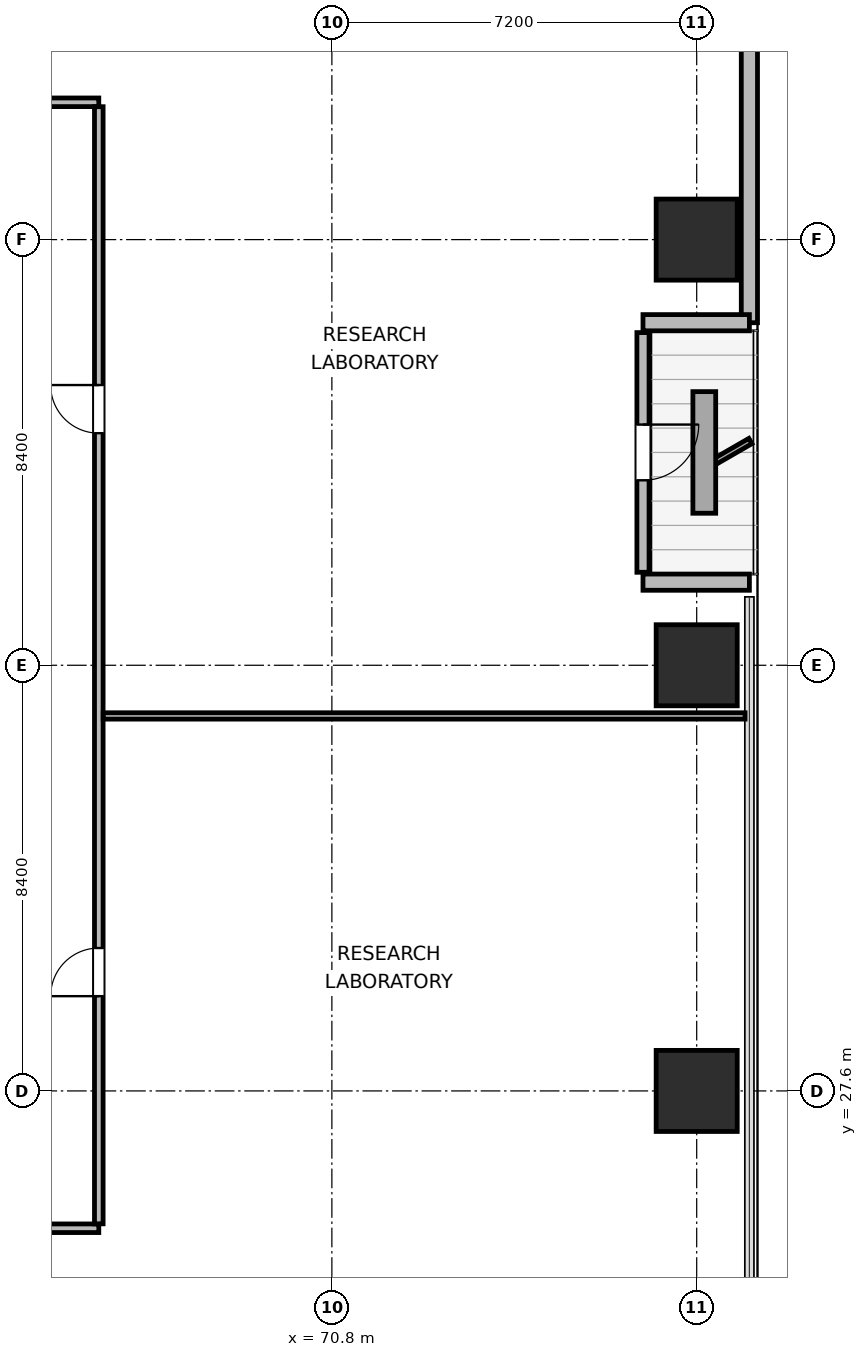
"""IFC4 building model, lengths in metres.
Left out: names, types, materials, properties, quantities, classifications, styles, units other than length and angle.
Written with IfcOpenShell. Run it as: python <this file> out.ifc"""

import sys

from ifc_helpers import new_model, si_unit, direction, frame, frame_2d, origin, origin_2d, place, context, subcontext, project, spatial, rectangle, extrude, element, fill, save


model = new_model("IFC4")
c1 = context("Model", 3, precision=1e-05, world=origin(), true_north=direction((0.0, 1.0)))
c2 = subcontext(c1, "Body", "Model", "MODEL_VIEW")
j1 = project(units=[si_unit("LENGTHUNIT", "METRE"), si_unit("PLANEANGLEUNIT", "RADIAN")], contexts=[c1])
p1 = place(None, origin())
s1 = spatial("IfcSite", under=j1, at=p1, CompositionType="ELEMENT")
p2 = place(p1, origin())
s2 = spatial("IfcBuilding", under=s1, at=p2, CompositionType="ELEMENT")
p3 = place(p2, frame((0.0, 0.0, 52.8)))
s3 = spatial("IfcBuildingStorey", under=s2, at=p3, CompositionType="ELEMENT", Elevation=52.8)
for number, where, z_axis, x_axis in (
    (1, (78.0, 27.6, 0.0), (0.0, 0.0, 1.0), (1.0, 0.0, 0.0)),
    (2, (78.0, 36.0, 0.0), (0.0, 0.0, 1.0), (1.0, 0.0, 0.0)),
    (3, (78.0, 44.4, 0.0), (0.0, 0.0, 1.0), (1.0, 0.0, 0.0)),
):
    element("IfcColumn", number, at=place(p3, frame(where, z_axis=z_axis, x_axis=x_axis)), inside=s3, PredefinedType="COLUMN", context=c2, shape_type="SweptSolid", body=[
        extrude(rectangle(XDim=1.6, YDim=1.6, at=origin_2d()), origin(), (0.0, 0.0, 1.0), 3.9),
    ])
p4 = place(p3, frame((79.04, 56.979, 0.0), z_axis=(0.0, 0.0, 1.0), x_axis=(0.0, -1.0, 0.0)))
e4 = element("IfcWall", 4, at=p4, inside=s3, PredefinedType="SOLIDWALL", context=c2, shape_type="SweptSolid", body=[
    extrude(rectangle(XDim=14.219, YDim=0.32, at=frame_2d((7.109, 0.0))), origin(), (0.0, 0.0, 1.0), 3.64),
])
p5 = place(p3, frame((79.04, 42.76, 0.0), z_axis=(0.0, 0.0, 1.0), x_axis=(-1.0, 0.0, 0.0)))
e5 = element("IfcWall", 5, at=p5, inside=s3, PredefinedType="SOLIDWALL", context=c2, shape_type="SweptSolid", body=[
    extrude(rectangle(XDim=2.1, YDim=0.32, at=frame_2d((1.05, 0.0))), origin(), (0.0, 0.0, 1.0), 2.875),
])
p6 = place(p3, frame((76.94, 42.565, 0.0), z_axis=(0.0, 0.0, 1.0), x_axis=(0.0, -1.0, 0.0)))
e6 = element("IfcWall", 6, at=p6, inside=s3, PredefinedType="SOLIDWALL", context=c2, shape_type="SweptSolid", body=[
    extrude(rectangle(XDim=4.73, YDim=0.24, at=frame_2d((2.365, 0.0))), origin(), (0.0, 0.0, 1.0), 3.162),
])
p7 = place(p6, frame((1.815, 0.0, 0.0)))
e7 = element("IfcOpeningElement", 7, at=p7, cuts=e6, PredefinedType="OPENING", context=c2, shape_type="SweptSolid", body=[
    extrude(rectangle(XDim=1.1, YDim=2.04, at=frame_2d((0.55, 1.02))), frame((0.0, 0.13, 0.0), z_axis=(0.0, -1.0, 0.0), x_axis=(1.0, 0.0, 0.0)), (0.0, 0.0, 1.0), 0.26),
])
p8 = place(p3, frame((76.94, 37.64, 0.0), z_axis=(0.0, 0.0, 1.0), x_axis=(1.0, 0.0, 0.0)))
e8 = element("IfcWall", 8, at=p8, inside=s3, PredefinedType="SOLIDWALL", context=c2, shape_type="SweptSolid", body=[
    extrude(rectangle(XDim=2.1, YDim=0.32, at=frame_2d((1.05, 0.0))), origin(), (0.0, 0.0, 1.0), 2.875),
])
p9 = place(p3, frame((29.8, 24.89, 0.0), z_axis=(0.0, 0.0, 1.0), x_axis=(1.0, 0.0, 0.0)))
e9 = element("IfcWall", 9, at=p9, inside=s3, PredefinedType="PARTITIONING", context=c2, shape_type="SweptSolid", body=[
    extrude(rectangle(XDim=36.4, YDim=0.17, at=frame_2d((18.2, 0.0))), origin(), (0.0, 0.0, 1.0), 3.64),
])
p10 = place(p9, frame((2.555, 0.0, 0.0)))
e10 = element("IfcOpeningElement", 10, at=p10, cuts=e9, PredefinedType="OPENING", context=c2, shape_type="SweptSolid", body=[
    extrude(rectangle(XDim=0.95, YDim=2.04, at=frame_2d((0.475, 1.02))), frame((0.0, 0.095, 0.0), z_axis=(0.0, -1.0, 0.0), x_axis=(1.0, 0.0, 0.0)), (0.0, 0.0, 1.0), 0.19),
])
p11 = place(p9, frame((8.01, 0.0, 0.0)))
e11 = element("IfcOpeningElement", 11, at=p11, cuts=e9, PredefinedType="OPENING", context=c2, shape_type="SweptSolid", body=[
    extrude(rectangle(XDim=0.95, YDim=2.04, at=frame_2d((0.475, 1.02))), frame((0.0, 0.095, 0.0), z_axis=(0.0, -1.0, 0.0), x_axis=(1.0, 0.0, 0.0)), (0.0, 0.0, 1.0), 0.19),
])
p12 = place(p9, frame((13.18, 0.0, 0.0)))
e12 = element("IfcOpeningElement", 12, at=p12, cuts=e9, PredefinedType="OPENING", context=c2, shape_type="SweptSolid", body=[
    extrude(rectangle(XDim=0.95, YDim=2.04, at=frame_2d((0.475, 1.02))), frame((0.0, 0.095, 0.0), z_axis=(0.0, -1.0, 0.0), x_axis=(1.0, 0.0, 0.0)), (0.0, 0.0, 1.0), 0.19),
])
p13 = place(p9, frame((18.04, 0.0, 0.0)))
e13 = element("IfcOpeningElement", 13, at=p13, cuts=e9, PredefinedType="OPENING", context=c2, shape_type="SweptSolid", body=[
    extrude(rectangle(XDim=0.95, YDim=2.04, at=frame_2d((0.475, 1.02))), frame((0.0, 0.095, 0.0), z_axis=(0.0, -1.0, 0.0), x_axis=(1.0, 0.0, 0.0)), (0.0, 0.0, 1.0), 0.19),
])
p14 = place(p9, frame((22.585, 0.0, 0.0)))
e14 = element("IfcOpeningElement", 14, at=p14, cuts=e9, PredefinedType="OPENING", context=c2, shape_type="SweptSolid", body=[
    extrude(rectangle(XDim=0.95, YDim=2.04, at=frame_2d((0.475, 1.02))), frame((0.0, 0.095, 0.0), z_axis=(0.0, -1.0, 0.0), x_axis=(1.0, 0.0, 0.0)), (0.0, 0.0, 1.0), 0.19),
])
p15 = place(p9, frame((27.44, 0.0, 0.0)))
e15 = element("IfcOpeningElement", 15, at=p15, cuts=e9, PredefinedType="OPENING", context=c2, shape_type="SweptSolid", body=[
    extrude(rectangle(XDim=0.95, YDim=2.04, at=frame_2d((0.475, 1.02))), frame((0.0, 0.095, 0.0), z_axis=(0.0, -1.0, 0.0), x_axis=(1.0, 0.0, 0.0)), (0.0, 0.0, 1.0), 0.19),
])
p16 = place(p9, frame((32.895, 0.0, 0.0)))
e16 = element("IfcOpeningElement", 16, at=p16, cuts=e9, PredefinedType="OPENING", context=c2, shape_type="SweptSolid", body=[
    extrude(rectangle(XDim=0.95, YDim=2.04, at=frame_2d((0.475, 1.02))), frame((0.0, 0.095, 0.0), z_axis=(0.0, -1.0, 0.0), x_axis=(1.0, 0.0, 0.0)), (0.0, 0.0, 1.0), 0.19),
])
p17 = place(p3, frame((29.8, 47.11, 0.0), z_axis=(0.0, 0.0, 1.0), x_axis=(1.0, 0.0, 0.0)))
e17 = element("IfcWall", 17, at=p17, inside=s3, PredefinedType="PARTITIONING", context=c2, shape_type="SweptSolid", body=[
    extrude(rectangle(XDim=36.4, YDim=0.17, at=frame_2d((18.2, 0.0))), origin(), (0.0, 0.0, 1.0), 3.64),
])
p18 = place(p17, frame((4.205, 0.0, 0.0)))
e18 = element("IfcOpeningElement", 18, at=p18, cuts=e17, PredefinedType="OPENING", context=c2, shape_type="SweptSolid", body=[
    extrude(rectangle(XDim=0.95, YDim=2.04, at=frame_2d((0.475, 1.02))), frame((0.0, 0.095, 0.0), z_axis=(0.0, -1.0, 0.0), x_axis=(1.0, 0.0, 0.0)), (0.0, 0.0, 1.0), 0.19),
])
p19 = place(p17, frame((10.385, 0.0, 0.0)))
e19 = element("IfcOpeningElement", 19, at=p19, cuts=e17, PredefinedType="OPENING", context=c2, shape_type="SweptSolid", body=[
    extrude(rectangle(XDim=0.95, YDim=2.04, at=frame_2d((0.475, 1.02))), frame((0.0, 0.095, 0.0), z_axis=(0.0, -1.0, 0.0), x_axis=(1.0, 0.0, 0.0)), (0.0, 0.0, 1.0), 0.19),
])
p20 = place(p17, frame((17.005, 0.0, 0.0)))
e20 = element("IfcOpeningElement", 20, at=p20, cuts=e17, PredefinedType="OPENING", context=c2, shape_type="SweptSolid", body=[
    extrude(rectangle(XDim=0.95, YDim=2.04, at=frame_2d((0.475, 1.02))), frame((0.0, 0.095, 0.0), z_axis=(0.0, -1.0, 0.0), x_axis=(1.0, 0.0, 0.0)), (0.0, 0.0, 1.0), 0.19),
])
p21 = place(p17, frame((24.755, 0.0, 0.0)))
e21 = element("IfcOpeningElement", 21, at=p21, cuts=e17, PredefinedType="OPENING", context=c2, shape_type="SweptSolid", body=[
    extrude(rectangle(XDim=0.95, YDim=2.04, at=frame_2d((0.475, 1.02))), frame((0.0, 0.095, 0.0), z_axis=(0.0, -1.0, 0.0), x_axis=(1.0, 0.0, 0.0)), (0.0, 0.0, 1.0), 0.19),
])
p22 = place(p17, frame((31.655, 0.0, 0.0)))
e22 = element("IfcOpeningElement", 22, at=p22, cuts=e17, PredefinedType="OPENING", context=c2, shape_type="SweptSolid", body=[
    extrude(rectangle(XDim=0.95, YDim=2.04, at=frame_2d((0.475, 1.02))), frame((0.0, 0.095, 0.0), z_axis=(0.0, -1.0, 0.0), x_axis=(1.0, 0.0, 0.0)), (0.0, 0.0, 1.0), 0.19),
])
p23 = place(p3, frame((66.2, 24.977, 0.0), z_axis=(0.0, 0.0, 1.0), x_axis=(0.0, 1.0, 0.0)))
e23 = element("IfcWall", 23, at=p23, inside=s3, PredefinedType="PARTITIONING", context=c2, shape_type="SweptSolid", body=[
    extrude(rectangle(XDim=22.046, YDim=0.17, at=frame_2d((11.023, 0.0))), origin(), (0.0, 0.0, 1.0), 3.64),
])
p24 = place(p23, frame((4.493, 0.0, 0.0)))
e24 = element("IfcOpeningElement", 24, at=p24, cuts=e23, PredefinedType="OPENING", context=c2, shape_type="SweptSolid", body=[
    extrude(rectangle(XDim=0.95, YDim=2.04, at=frame_2d((0.475, 1.02))), frame((0.0, 0.095, 0.0), z_axis=(0.0, -1.0, 0.0), x_axis=(1.0, 0.0, 0.0)), (0.0, 0.0, 1.0), 0.19),
])
p25 = place(p23, frame((15.603, 0.0, 0.0)))
e25 = element("IfcOpeningElement", 25, at=p25, cuts=e23, PredefinedType="OPENING", context=c2, shape_type="SweptSolid", body=[
    extrude(rectangle(XDim=0.95, YDim=2.04, at=frame_2d((0.475, 1.02))), frame((0.0, 0.095, 0.0), z_axis=(0.0, -1.0, 0.0), x_axis=(1.0, 0.0, 0.0)), (0.0, 0.0, 1.0), 0.19),
])
p26 = place(p3, frame((66.287, 35.0, 0.0), z_axis=(0.0, 0.0, 1.0), x_axis=(1.0, 0.0, 0.0)))
e26 = element("IfcWall", 26, at=p26, inside=s3, PredefinedType="PARTITIONING", context=c2, shape_type="SweptSolid", body=[
    extrude(rectangle(XDim=12.668, YDim=0.125, at=frame_2d((6.334, 0.0))), origin(), (0.0, 0.0, 1.0), 3.64),
])
p27 = place(p7, origin())
e27 = element("IfcDoor", 27, at=p27, inside=s3, OperationType="SINGLE_SWING_LEFT", PredefinedType="DOOR", context=c2, shape_type="SweptSolid", body=[
    extrude(rectangle(XDim=1.1, YDim=2.04, at=frame_2d((0.55, 1.02))), frame((0.0, 0.025, 0.0), z_axis=(0.0, -1.0, 0.0), x_axis=(1.0, 0.0, 0.0)), (0.0, 0.0, 1.0), 0.05),
])
fill(e7, e27)
p28 = place(p24, origin())
e28 = element("IfcDoor", 28, at=p28, inside=s3, OperationType="SINGLE_SWING_LEFT", PredefinedType="DOOR", context=c2, shape_type="SweptSolid", body=[
    extrude(rectangle(XDim=0.95, YDim=2.04, at=frame_2d((0.475, 1.02))), frame((0.0, 0.025, 0.0), z_axis=(0.0, -1.0, 0.0), x_axis=(1.0, 0.0, 0.0)), (0.0, 0.0, 1.0), 0.05),
])
fill(e24, e28)
p29 = place(p25, origin())
e29 = element("IfcDoor", 29, at=p29, inside=s3, OperationType="SINGLE_SWING_RIGHT", PredefinedType="DOOR", context=c2, shape_type="SweptSolid", body=[
    extrude(rectangle(XDim=0.95, YDim=2.04, at=frame_2d((0.475, 1.02))), frame((0.0, 0.025, 0.0), z_axis=(0.0, -1.0, 0.0), x_axis=(1.0, 0.0, 0.0)), (0.0, 0.0, 1.0), 0.05),
])
fill(e25, e29)
save(model, sys.argv[1])
